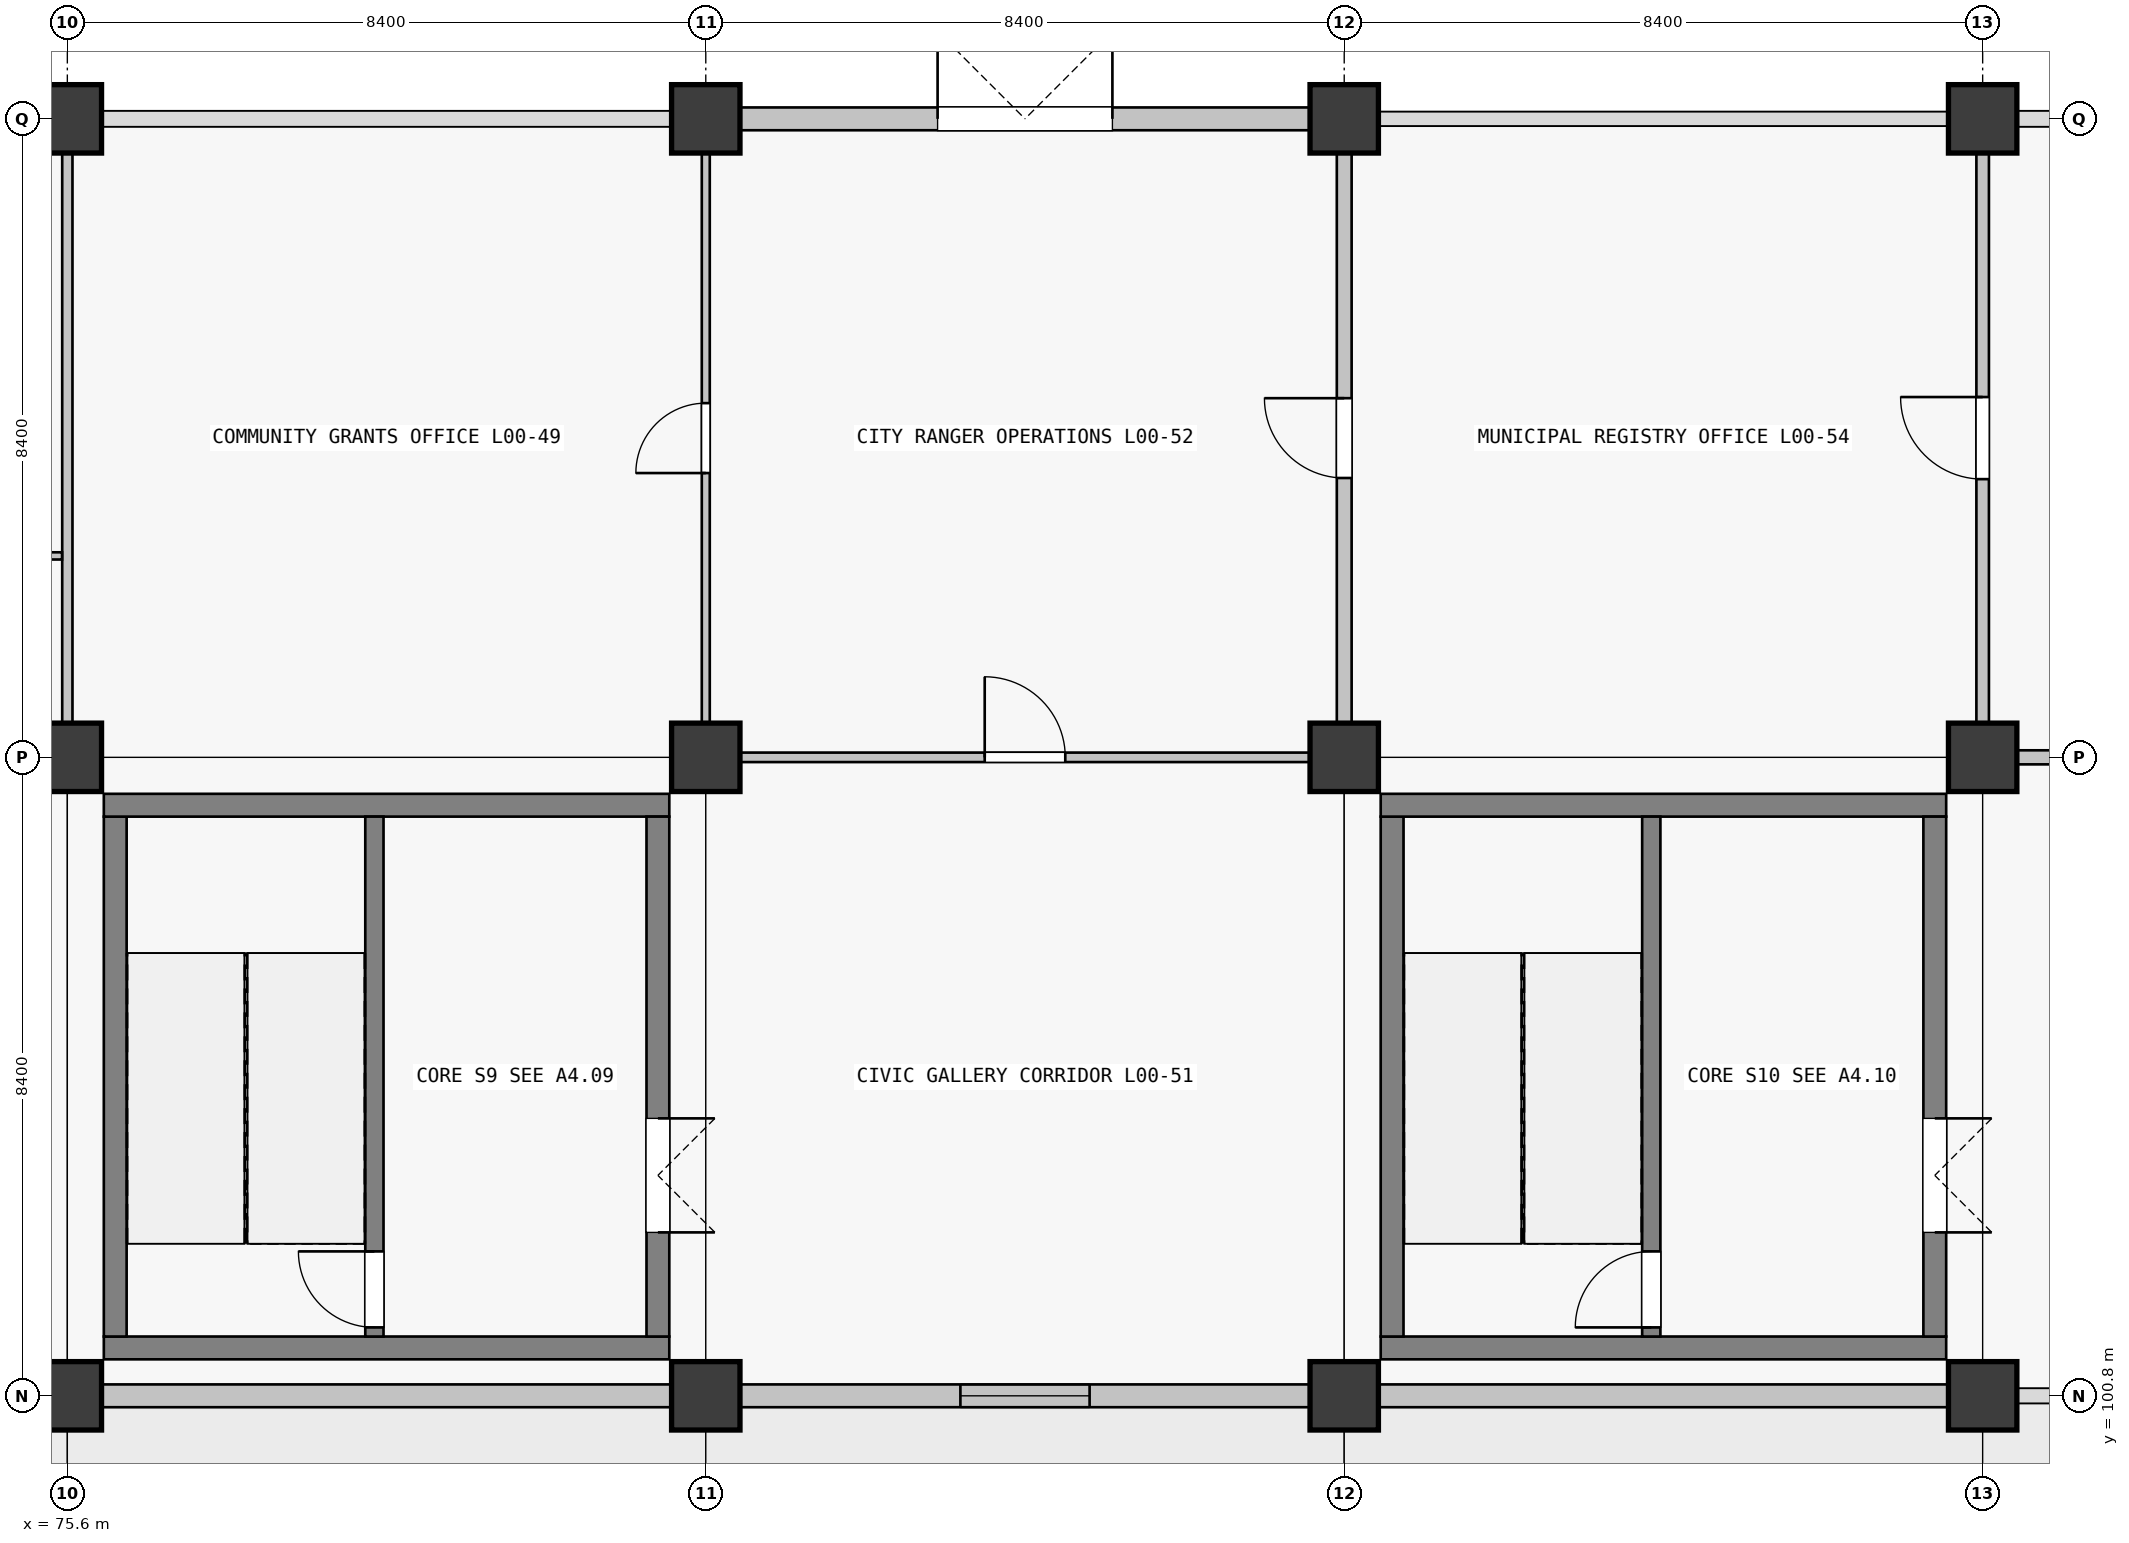
"""IFC4 building model, lengths in metres.
Left out: names, types, materials, properties, quantities, classifications, styles, units other than length and angle.
Written with IfcOpenShell. Run it as: python <this file> out.ifc"""

import sys

from ifc_helpers import new_model, si_unit, direction, frame, frame_2d, origin, origin_2d, place, context, subcontext, project, spatial, rectangle, extrude, element, fill, save


model = new_model("IFC4")
c1 = context("Model", 3, precision=1e-05, world=origin(), true_north=direction((0.0, 1.0)))
c2 = subcontext(c1, "Body", "Model", "MODEL_VIEW")
j1 = project(units=[si_unit("LENGTHUNIT", "METRE"), si_unit("PLANEANGLEUNIT", "RADIAN")], contexts=[c1])
p1 = place(None, origin())
s1 = spatial("IfcSite", under=j1, at=p1, CompositionType="ELEMENT")
p2 = place(p1, origin())
s2 = spatial("IfcBuilding", under=s1, at=p2, CompositionType="ELEMENT")
p3 = place(p2, origin())
s3 = spatial("IfcBuildingStorey", under=s2, at=p3, CompositionType="ELEMENT", Elevation=0.0)
for number, where, z_axis, x_axis in (
    (1, (75.6, 100.8, 0.0), (0.0, 0.0, 1.0), (1.0, 0.0, 0.0)),
    (2, (75.6, 109.2, 0.0), (0.0, 0.0, 1.0), (1.0, 0.0, 0.0)),
    (3, (75.6, 117.6, 0.0), (0.0, 0.0, 1.0), (1.0, 0.0, 0.0)),
    (4, (84.0, 100.8, 0.0), (0.0, 0.0, 1.0), (1.0, 0.0, 0.0)),
    (5, (84.0, 109.2, 0.0), (0.0, 0.0, 1.0), (1.0, 0.0, 0.0)),
    (6, (84.0, 117.6, 0.0), (0.0, 0.0, 1.0), (1.0, 0.0, 0.0)),
    (7, (92.4, 100.8, 0.0), (0.0, 0.0, 1.0), (1.0, 0.0, 0.0)),
    (8, (92.4, 109.2, 0.0), (0.0, 0.0, 1.0), (1.0, 0.0, 0.0)),
    (9, (92.4, 117.6, 0.0), (0.0, 0.0, 1.0), (1.0, 0.0, 0.0)),
    (10, (100.8, 100.8, 0.0), (0.0, 0.0, 1.0), (1.0, 0.0, 0.0)),
    (11, (100.8, 109.2, 0.0), (0.0, 0.0, 1.0), (1.0, 0.0, 0.0)),
    (12, (100.8, 117.6, 0.0), (0.0, 0.0, 1.0), (1.0, 0.0, 0.0)),
):
    element("IfcColumn", number, at=place(p3, frame(where, z_axis=z_axis, x_axis=x_axis)), inside=s3, PredefinedType="COLUMN", context=c2, shape_type="SweptSolid", body=[
        extrude(rectangle(XDim=0.9, YDim=0.9, at=origin_2d()), origin(), (0.0, 0.0, 1.0), 5.76),
    ])
p4 = place(p3, frame((83.549, 100.8, 0.0), z_axis=(0.0, 0.0, 1.0), x_axis=(-1.0, 0.0, 0.0)))
e13 = element("IfcWall", 13, at=p4, inside=s3, PredefinedType="SOLIDWALL", context=c2, shape_type="SweptSolid", body=[
    extrude(rectangle(XDim=7.498, YDim=0.3, at=frame_2d((3.749, 0.0))), origin(), (0.0, 0.0, 1.0), 4.7),
])
p5 = place(p3, frame((91.949, 100.8, 0.0), z_axis=(0.0, 0.0, 1.0), x_axis=(-1.0, 0.0, 0.0)))
e14 = element("IfcWall", 14, at=p5, inside=s3, PredefinedType="SOLIDWALL", context=c2, shape_type="SweptSolid", body=[
    extrude(rectangle(XDim=7.498, YDim=0.3, at=frame_2d((3.749, 0.0))), origin(), (0.0, 0.0, 1.0), 4.7),
])
p6 = place(p5, frame((2.899, 0.0, 0.9)))
e15 = element("IfcOpeningElement", 15, at=p6, cuts=e14, PredefinedType="OPENING", context=c2, shape_type="SweptSolid", body=[
    extrude(rectangle(XDim=1.7, YDim=1.85, at=frame_2d((0.85, 0.925))), frame((0.0, 0.15, 0.0), z_axis=(0.0, -1.0, 0.0), x_axis=(1.0, 0.0, 0.0)), (0.0, 0.0, 1.0), 0.3),
])
p7 = place(p3, frame((84.451, 117.6, 0.0), z_axis=(0.0, 0.0, 1.0), x_axis=(1.0, 0.0, 0.0)))
e16 = element("IfcWall", 16, at=p7, inside=s3, PredefinedType="SOLIDWALL", context=c2, shape_type="SweptSolid", body=[
    extrude(rectangle(XDim=7.498, YDim=0.3, at=frame_2d((3.749, 0.0))), origin(), (0.0, 0.0, 1.0), 4.7),
])
p8 = place(p7, frame((2.599, 0.0, 0.0)))
e17 = element("IfcOpeningElement", 17, at=p8, cuts=e16, PredefinedType="OPENING", context=c2, shape_type="SweptSolid", body=[
    extrude(rectangle(XDim=2.3, YDim=2.3, at=frame_2d((1.15, 1.15))), frame((0.0, 0.15, 0.0), z_axis=(0.0, -1.0, 0.0), x_axis=(1.0, 0.0, 0.0)), (0.0, 0.0, 1.0), 0.3),
])
p9 = place(p3, frame((100.349, 100.8, 0.0), z_axis=(0.0, 0.0, 1.0), x_axis=(-1.0, 0.0, 0.0)))
e18 = element("IfcWall", 18, at=p9, inside=s3, PredefinedType="SOLIDWALL", context=c2, shape_type="SweptSolid", body=[
    extrude(rectangle(XDim=7.498, YDim=0.3, at=frame_2d((3.749, 0.0))), origin(), (0.0, 0.0, 1.0), 4.7),
])
p10 = place(p3, frame((83.52, 101.43, 0.0), z_axis=(0.0, 0.0, 1.0), x_axis=(-1.0, 0.0, 0.0)))
e19 = element("IfcWall", 19, at=p10, inside=s3, PredefinedType="SHEAR", context=c2, shape_type="SweptSolid", body=[
    extrude(rectangle(XDim=7.44, YDim=0.3, at=frame_2d((3.72, 0.0))), origin(), (0.0, 0.0, 1.0), 5.76),
])
p11 = place(p3, frame((76.23, 101.58, 0.0), z_axis=(0.0, 0.0, 1.0), x_axis=(0.0, 1.0, 0.0)))
e20 = element("IfcWall", 20, at=p11, inside=s3, PredefinedType="SHEAR", context=c2, shape_type="SweptSolid", body=[
    extrude(rectangle(XDim=6.84, YDim=0.3, at=frame_2d((3.42, 0.0))), origin(), (0.0, 0.0, 1.0), 5.76),
])
p12 = place(p3, frame((76.08, 108.57, 0.0), z_axis=(0.0, 0.0, 1.0), x_axis=(1.0, 0.0, 0.0)))
e21 = element("IfcWall", 21, at=p12, inside=s3, PredefinedType="SHEAR", context=c2, shape_type="SweptSolid", body=[
    extrude(rectangle(XDim=7.44, YDim=0.3, at=frame_2d((3.72, 0.0))), origin(), (0.0, 0.0, 1.0), 5.76),
])
p13 = place(p3, frame((83.37, 108.42, 0.0), z_axis=(0.0, 0.0, 1.0), x_axis=(0.0, -1.0, 0.0)))
e22 = element("IfcWall", 22, at=p13, inside=s3, PredefinedType="SHEAR", context=c2, shape_type="SweptSolid", body=[
    extrude(rectangle(XDim=6.84, YDim=0.3, at=frame_2d((3.42, 0.0))), origin(), (0.0, 0.0, 1.0), 5.76),
])
p14 = place(p13, frame((3.97, 0.0, 0.0)))
e23 = element("IfcOpeningElement", 23, at=p14, cuts=e22, PredefinedType="OPENING", context=c2, shape_type="SweptSolid", body=[
    extrude(rectangle(XDim=1.5, YDim=2.15, at=frame_2d((0.75, 1.075))), frame((0.0, 0.15, 0.0), z_axis=(0.0, -1.0, 0.0), x_axis=(1.0, 0.0, 0.0)), (0.0, 0.0, 1.0), 0.3),
])
p15 = place(p3, frame((79.64, 101.58, 0.0), z_axis=(0.0, 0.0, 1.0), x_axis=(0.0, 1.0, 0.0)))
e24 = element("IfcWall", 24, at=p15, inside=s3, PredefinedType="SHEAR", context=c2, shape_type="SweptSolid", body=[
    extrude(rectangle(XDim=6.84, YDim=0.24, at=frame_2d((3.42, 0.0))), origin(), (0.0, 0.0, 1.0), 5.76),
])
p16 = place(p15, frame((0.12, 0.0, 0.0)))
e25 = element("IfcOpeningElement", 25, at=p16, cuts=e24, PredefinedType="OPENING", context=c2, shape_type="SweptSolid", body=[
    extrude(rectangle(XDim=1.0, YDim=2.15, at=frame_2d((0.5, 1.075))), frame((0.0, 0.12, 0.0), z_axis=(0.0, -1.0, 0.0), x_axis=(1.0, 0.0, 0.0)), (0.0, 0.0, 1.0), 0.24),
])
p17 = place(p3, frame((100.32, 101.43, 0.0), z_axis=(0.0, 0.0, 1.0), x_axis=(-1.0, 0.0, 0.0)))
e26 = element("IfcWall", 26, at=p17, inside=s3, PredefinedType="SHEAR", context=c2, shape_type="SweptSolid", body=[
    extrude(rectangle(XDim=7.44, YDim=0.3, at=frame_2d((3.72, 0.0))), origin(), (0.0, 0.0, 1.0), 5.76),
])
p18 = place(p3, frame((93.03, 101.58, 0.0), z_axis=(0.0, 0.0, 1.0), x_axis=(0.0, 1.0, 0.0)))
e27 = element("IfcWall", 27, at=p18, inside=s3, PredefinedType="SHEAR", context=c2, shape_type="SweptSolid", body=[
    extrude(rectangle(XDim=6.84, YDim=0.3, at=frame_2d((3.42, 0.0))), origin(), (0.0, 0.0, 1.0), 5.76),
])
p19 = place(p3, frame((92.88, 108.57, 0.0), z_axis=(0.0, 0.0, 1.0), x_axis=(1.0, 0.0, 0.0)))
e28 = element("IfcWall", 28, at=p19, inside=s3, PredefinedType="SHEAR", context=c2, shape_type="SweptSolid", body=[
    extrude(rectangle(XDim=7.44, YDim=0.3, at=frame_2d((3.72, 0.0))), origin(), (0.0, 0.0, 1.0), 5.76),
])
p20 = place(p3, frame((100.17, 108.42, 0.0), z_axis=(0.0, 0.0, 1.0), x_axis=(0.0, -1.0, 0.0)))
e29 = element("IfcWall", 29, at=p20, inside=s3, PredefinedType="SHEAR", context=c2, shape_type="SweptSolid", body=[
    extrude(rectangle(XDim=6.84, YDim=0.3, at=frame_2d((3.42, 0.0))), origin(), (0.0, 0.0, 1.0), 5.76),
])
p21 = place(p20, frame((3.97, 0.0, 0.0)))
e30 = element("IfcOpeningElement", 30, at=p21, cuts=e29, PredefinedType="OPENING", context=c2, shape_type="SweptSolid", body=[
    extrude(rectangle(XDim=1.5, YDim=2.15, at=frame_2d((0.75, 1.075))), frame((0.0, 0.15, 0.0), z_axis=(0.0, -1.0, 0.0), x_axis=(1.0, 0.0, 0.0)), (0.0, 0.0, 1.0), 0.3),
])
p22 = place(p3, frame((96.44, 101.58, 0.0), z_axis=(0.0, 0.0, 1.0), x_axis=(0.0, 1.0, 0.0)))
e31 = element("IfcWall", 31, at=p22, inside=s3, PredefinedType="SHEAR", context=c2, shape_type="SweptSolid", body=[
    extrude(rectangle(XDim=6.84, YDim=0.24, at=frame_2d((3.42, 0.0))), origin(), (0.0, 0.0, 1.0), 5.76),
])
p23 = place(p22, frame((0.12, 0.0, 0.0)))
e32 = element("IfcOpeningElement", 32, at=p23, cuts=e31, PredefinedType="OPENING", context=c2, shape_type="SweptSolid", body=[
    extrude(rectangle(XDim=1.0, YDim=2.15, at=frame_2d((0.5, 1.075))), frame((0.0, 0.12, 0.0), z_axis=(0.0, -1.0, 0.0), x_axis=(1.0, 0.0, 0.0)), (0.0, 0.0, 1.0), 0.24),
])
p24 = place(p3, frame((84.452, 109.2, 0.0), z_axis=(0.0, 0.0, 1.0), x_axis=(1.0, 0.0, 0.0)))
e33 = element("IfcWall", 33, at=p24, inside=s3, PredefinedType="PARTITIONING", context=c2, shape_type="SweptSolid", body=[
    extrude(rectangle(XDim=7.496, YDim=0.125, at=frame_2d((3.748, 0.0))), origin(), (0.0, 0.0, 1.0), 3.66),
])
p25 = place(p24, frame((3.218, 0.0, 0.0)))
e34 = element("IfcOpeningElement", 34, at=p25, cuts=e33, PredefinedType="OPENING", context=c2, shape_type="SweptSolid", body=[
    extrude(rectangle(XDim=1.06, YDim=2.25, at=frame_2d((0.53, 1.125))), frame((0.0, 0.062, 0.0), z_axis=(0.0, -1.0, 0.0), x_axis=(1.0, 0.0, 0.0)), (0.0, 0.0, 1.0), 0.125),
])
p26 = place(p3, frame((101.252, 109.2, 0.0), z_axis=(0.0, 0.0, 1.0), x_axis=(1.0, 0.0, 0.0)))
e35 = element("IfcWall", 35, at=p26, inside=s3, PredefinedType="PARTITIONING", context=c2, shape_type="SweptSolid", body=[
    extrude(rectangle(XDim=7.496, YDim=0.185, at=frame_2d((3.748, 0.0))), origin(), (0.0, 0.0, 1.0), 3.66),
])
p27 = place(p26, frame((3.278, 0.0, 0.0)))
e36 = element("IfcOpeningElement", 36, at=p27, cuts=e35, PredefinedType="OPENING", context=c2, shape_type="SweptSolid", body=[
    extrude(rectangle(XDim=0.94, YDim=2.15, at=frame_2d((0.47, 1.075))), frame((0.0, 0.093, 0.0), z_axis=(0.0, -1.0, 0.0), x_axis=(1.0, 0.0, 0.0)), (0.0, 0.0, 1.0), 0.185),
])
p28 = place(p3, frame((75.6, 109.652, 0.0), z_axis=(0.0, 0.0, 1.0), x_axis=(0.0, 1.0, 0.0)))
e37 = element("IfcWall", 37, at=p28, inside=s3, PredefinedType="PARTITIONING", context=c2, shape_type="SweptSolid", body=[
    extrude(rectangle(XDim=7.496, YDim=0.135, at=frame_2d((3.748, 0.0))), origin(), (0.0, 0.0, 1.0), 3.66),
])
p29 = place(p3, frame((84.0, 109.652, 0.0), z_axis=(0.0, 0.0, 1.0), x_axis=(0.0, 1.0, 0.0)))
e38 = element("IfcWall", 38, at=p29, inside=s3, PredefinedType="PARTITIONING", context=c2, shape_type="SweptSolid", body=[
    extrude(rectangle(XDim=7.496, YDim=0.105, at=frame_2d((3.748, 0.0))), origin(), (0.0, 0.0, 1.0), 3.66),
])
p30 = place(p29, frame((3.288, 0.0, 0.0)))
e39 = element("IfcOpeningElement", 39, at=p30, cuts=e38, PredefinedType="OPENING", context=c2, shape_type="SweptSolid", body=[
    extrude(rectangle(XDim=0.92, YDim=2.15, at=frame_2d((0.46, 1.075))), frame((0.0, 0.052, 0.0), z_axis=(0.0, -1.0, 0.0), x_axis=(1.0, 0.0, 0.0)), (0.0, 0.0, 1.0), 0.105),
])
p31 = place(p3, frame((92.4, 109.652, 0.0), z_axis=(0.0, 0.0, 1.0), x_axis=(0.0, 1.0, 0.0)))
e40 = element("IfcWall", 40, at=p31, inside=s3, PredefinedType="PARTITIONING", context=c2, shape_type="SweptSolid", body=[
    extrude(rectangle(XDim=7.496, YDim=0.195, at=frame_2d((3.748, 0.0))), origin(), (0.0, 0.0, 1.0), 3.66),
])
p32 = place(p31, frame((3.223, 0.0, 0.0)))
e41 = element("IfcOpeningElement", 41, at=p32, cuts=e40, PredefinedType="OPENING", context=c2, shape_type="SweptSolid", body=[
    extrude(rectangle(XDim=1.05, YDim=2.12, at=frame_2d((0.525, 1.06))), frame((0.0, 0.098, 0.0), z_axis=(0.0, -1.0, 0.0), x_axis=(1.0, 0.0, 0.0)), (0.0, 0.0, 1.0), 0.195),
])
p33 = place(p3, frame((100.8, 109.652, 0.0), z_axis=(0.0, 0.0, 1.0), x_axis=(0.0, 1.0, 0.0)))
e42 = element("IfcWall", 42, at=p33, inside=s3, PredefinedType="PARTITIONING", context=c2, shape_type="SweptSolid", body=[
    extrude(rectangle(XDim=7.496, YDim=0.165, at=frame_2d((3.748, 0.0))), origin(), (0.0, 0.0, 1.0), 3.66),
])
p34 = place(p33, frame((3.208, 0.0, 0.0)))
e43 = element("IfcOpeningElement", 43, at=p34, cuts=e42, PredefinedType="OPENING", context=c2, shape_type="SweptSolid", body=[
    extrude(rectangle(XDim=1.08, YDim=2.25, at=frame_2d((0.54, 1.125))), frame((0.0, 0.083, 0.0), z_axis=(0.0, -1.0, 0.0), x_axis=(1.0, 0.0, 0.0)), (0.0, 0.0, 1.0), 0.165),
])
p35 = place(p3, frame((67.284, 111.85, 0.0), z_axis=(0.0, 0.0, 1.0), x_axis=(1.0, 0.0, 0.0)))
e44 = element("IfcWall", 44, at=p35, inside=s3, PredefinedType="PARTITIONING", context=c2, shape_type="SweptSolid", body=[
    extrude(rectangle(XDim=8.246, YDim=0.095, at=frame_2d((4.123, 0.0))), origin(), (0.0, 0.0, 1.0), 3.66),
])
p36 = place(p6, origin())
e45 = element("IfcWindow", 45, at=p36, inside=s3, PartitioningType="SINGLE_PANEL", PredefinedType="WINDOW", context=c2, shape_type="SweptSolid", body=[
    extrude(rectangle(XDim=1.7, YDim=1.85, at=frame_2d((0.85, 0.925))), frame((0.0, 0.03, 0.0), z_axis=(0.0, -1.0, 0.0), x_axis=(1.0, 0.0, 0.0)), (0.0, 0.0, 1.0), 0.06),
])
fill(e15, e45)
p37 = place(p8, origin())
e46 = element("IfcDoor", 46, at=p37, inside=s3, OperationType="DOUBLE_DOOR_SINGLE_SWING", PredefinedType="DOOR", context=c2, shape_type="SweptSolid", body=[
    extrude(rectangle(XDim=2.3, YDim=2.3, at=frame_2d((1.15, 1.15))), frame((0.0, 0.025, 0.0), z_axis=(0.0, -1.0, 0.0), x_axis=(1.0, 0.0, 0.0)), (0.0, 0.0, 1.0), 0.05),
])
fill(e17, e46)
p38 = place(p16, origin())
e47 = element("IfcDoor", 47, at=p38, inside=s3, OperationType="SINGLE_SWING_RIGHT", PredefinedType="DOOR", context=c2, shape_type="SweptSolid", body=[
    extrude(rectangle(XDim=1.0, YDim=2.15, at=frame_2d((0.5, 1.075))), frame((0.0, 0.025, 0.0), z_axis=(0.0, -1.0, 0.0), x_axis=(1.0, 0.0, 0.0)), (0.0, 0.0, 1.0), 0.05),
])
fill(e25, e47)
p39 = place(p14, origin())
e48 = element("IfcDoor", 48, at=p39, inside=s3, OperationType="DOUBLE_DOOR_SINGLE_SWING", PredefinedType="DOOR", context=c2, shape_type="SweptSolid", body=[
    extrude(rectangle(XDim=1.5, YDim=2.15, at=frame_2d((0.75, 1.075))), frame((0.0, 0.025, 0.0), z_axis=(0.0, -1.0, 0.0), x_axis=(1.0, 0.0, 0.0)), (0.0, 0.0, 1.0), 0.05),
])
fill(e23, e48)
p40 = place(p23, origin())
e49 = element("IfcDoor", 49, at=p40, inside=s3, OperationType="SINGLE_SWING_LEFT", PredefinedType="DOOR", context=c2, shape_type="SweptSolid", body=[
    extrude(rectangle(XDim=1.0, YDim=2.15, at=frame_2d((0.5, 1.075))), frame((0.0, 0.025, 0.0), z_axis=(0.0, -1.0, 0.0), x_axis=(1.0, 0.0, 0.0)), (0.0, 0.0, 1.0), 0.05),
])
fill(e32, e49)
p41 = place(p21, origin())
e50 = element("IfcDoor", 50, at=p41, inside=s3, OperationType="DOUBLE_DOOR_SINGLE_SWING", PredefinedType="DOOR", context=c2, shape_type="SweptSolid", body=[
    extrude(rectangle(XDim=1.5, YDim=2.15, at=frame_2d((0.75, 1.075))), frame((0.0, 0.025, 0.0), z_axis=(0.0, -1.0, 0.0), x_axis=(1.0, 0.0, 0.0)), (0.0, 0.0, 1.0), 0.05),
])
fill(e30, e50)
p42 = place(p25, origin())
e51 = element("IfcDoor", 51, at=p42, inside=s3, OperationType="SINGLE_SWING_LEFT", PredefinedType="DOOR", context=c2, shape_type="SweptSolid", body=[
    extrude(rectangle(XDim=1.06, YDim=2.25, at=frame_2d((0.53, 1.125))), frame((0.0, 0.025, 0.0), z_axis=(0.0, -1.0, 0.0), x_axis=(1.0, 0.0, 0.0)), (0.0, 0.0, 1.0), 0.05),
])
fill(e34, e51)
p43 = place(p30, origin())
e52 = element("IfcDoor", 52, at=p43, inside=s3, OperationType="SINGLE_SWING_LEFT", PredefinedType="DOOR", context=c2, shape_type="SweptSolid", body=[
    extrude(rectangle(XDim=0.92, YDim=2.15, at=frame_2d((0.46, 1.075))), frame((0.0, 0.025, 0.0), z_axis=(0.0, -1.0, 0.0), x_axis=(1.0, 0.0, 0.0)), (0.0, 0.0, 1.0), 0.05),
])
fill(e39, e52)
p44 = place(p32, origin())
e53 = element("IfcDoor", 53, at=p44, inside=s3, OperationType="SINGLE_SWING_RIGHT", PredefinedType="DOOR", context=c2, shape_type="SweptSolid", body=[
    extrude(rectangle(XDim=1.05, YDim=2.12, at=frame_2d((0.525, 1.06))), frame((0.0, 0.025, 0.0), z_axis=(0.0, -1.0, 0.0), x_axis=(1.0, 0.0, 0.0)), (0.0, 0.0, 1.0), 0.05),
])
fill(e41, e53)
p45 = place(p34, origin())
e54 = element("IfcDoor", 54, at=p45, inside=s3, OperationType="SINGLE_SWING_RIGHT", PredefinedType="DOOR", context=c2, shape_type="SweptSolid", body=[
    extrude(rectangle(XDim=1.08, YDim=2.25, at=frame_2d((0.54, 1.125))), frame((0.0, 0.025, 0.0), z_axis=(0.0, -1.0, 0.0), x_axis=(1.0, 0.0, 0.0)), (0.0, 0.0, 1.0), 0.05),
])
fill(e43, e54)
save(model, sys.argv[1])
